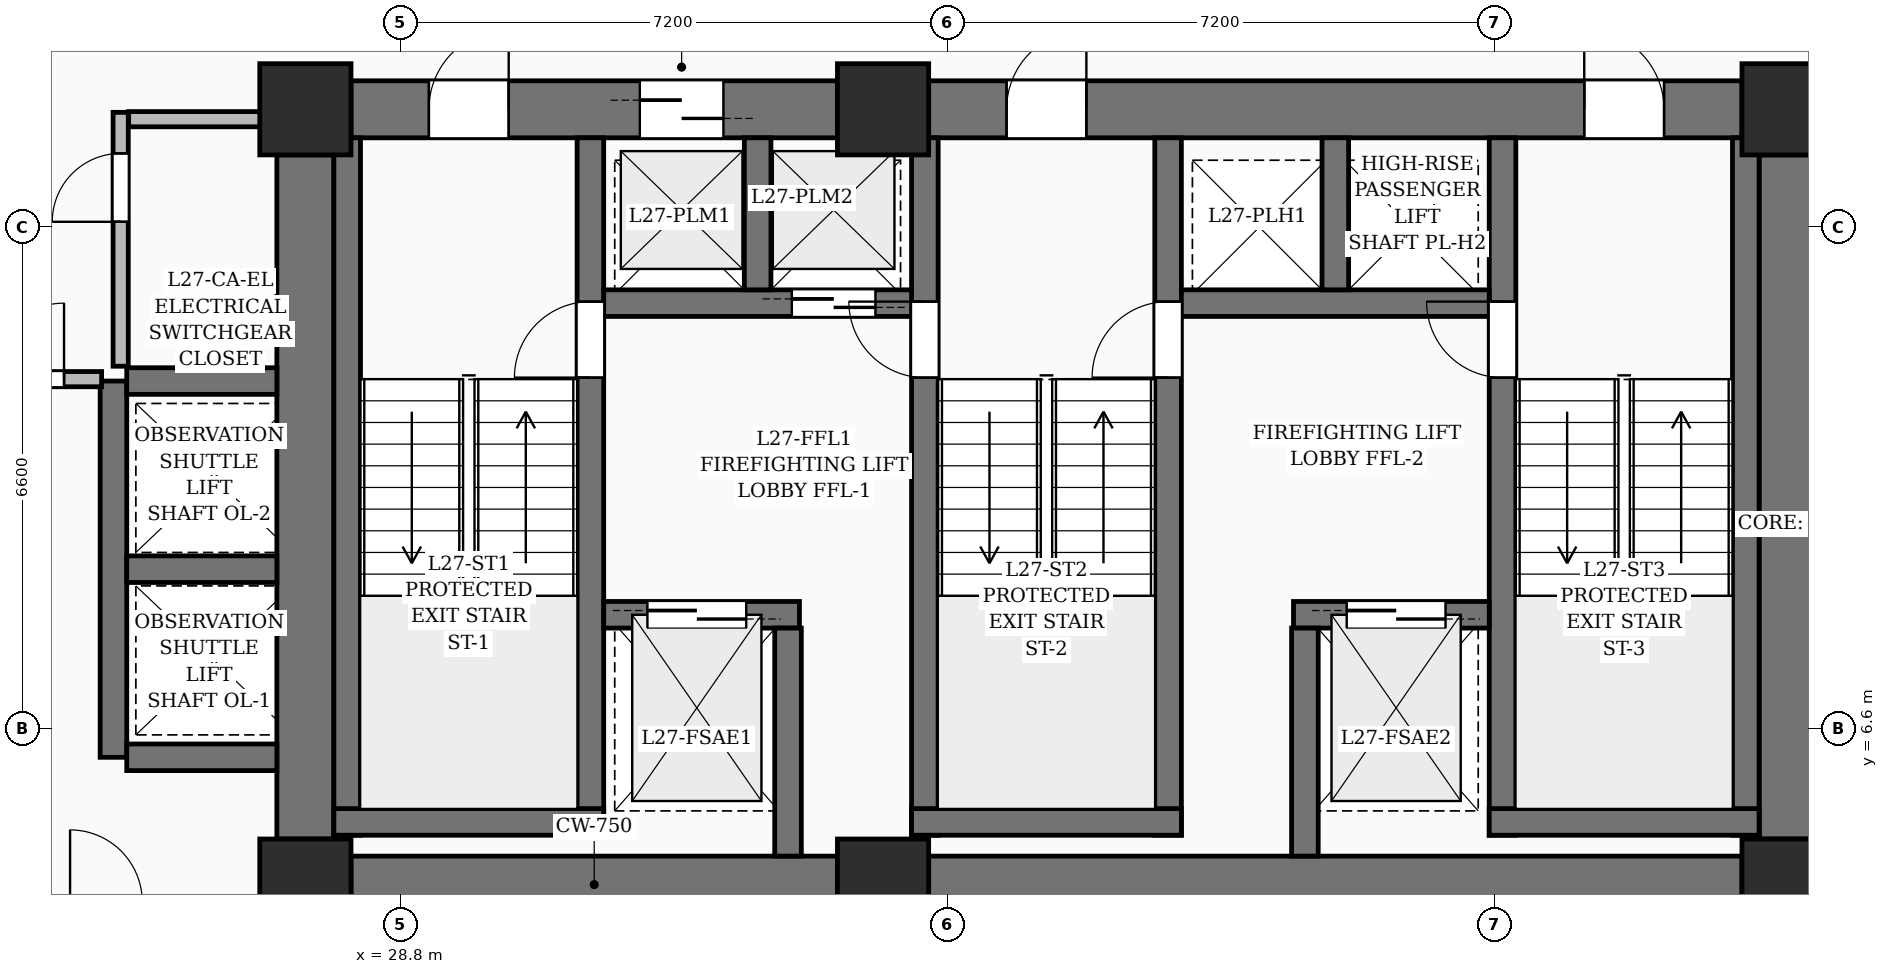
"""IFC4 building model, lengths in metres.
Left out: names, types, materials, properties, quantities, classifications, styles, units other than length and angle.
Written with IfcOpenShell. Run it as: python <this file> out.ifc"""

import sys

from ifc_helpers import new_model, si_unit, direction, frame, frame_2d, origin, origin_2d, place, context, subcontext, project, spatial, rectangle, extrude, element, fill, save


model = new_model("IFC4")
c1 = context("Model", 3, precision=1e-05, world=origin(), true_north=direction((0.0, 1.0)))
c2 = subcontext(c1, "Body", "Model", "MODEL_VIEW")
j1 = project(units=[si_unit("LENGTHUNIT", "METRE"), si_unit("PLANEANGLEUNIT", "RADIAN")], contexts=[c1])
p1 = place(None, origin())
s1 = spatial("IfcSite", under=j1, at=p1, CompositionType="ELEMENT")
p2 = place(p1, origin())
s2 = spatial("IfcBuilding", under=s1, at=p2, CompositionType="ELEMENT")
p3 = place(p2, frame((0.0, 0.0, 110.4)))
s3 = spatial("IfcBuildingStorey", under=s2, at=p3, CompositionType="ELEMENT", Elevation=110.4)
for number, where, z_axis, x_axis in (
    (1, (27.55, 4.55, 0.0), (0.0, 0.0, 1.0), (1.0, 0.0, 0.0)),
    (2, (35.15, 4.55, 0.0), (0.0, 0.0, 1.0), (1.0, 0.0, 0.0)),
    (3, (47.05, 4.55, 0.0), (0.0, 0.0, 1.0), (1.0, 0.0, 0.0)),
    (4, (27.55, 14.75, 0.0), (0.0, 0.0, 1.0), (1.0, 0.0, 0.0)),
    (5, (35.15, 14.75, 0.0), (0.0, 0.0, 1.0), (1.0, 0.0, 0.0)),
    (6, (47.05, 14.75, 0.0), (0.0, 0.0, 1.0), (1.0, 0.0, 0.0)),
):
    element("IfcColumn", number, at=place(p3, frame(where, z_axis=z_axis, x_axis=x_axis)), inside=s3, PredefinedType="COLUMN", context=c2, shape_type="SweptSolid", body=[
        extrude(rectangle(XDim=1.2, YDim=1.2, at=origin_2d()), origin(), (0.0, 0.0, 1.0), 3.6),
    ])
p4 = place(p3, frame((28.15, 4.55, 0.0), z_axis=(0.0, 0.0, 1.0), x_axis=(1.0, 0.0, 0.0)))
e7 = element("IfcWall", 7, at=p4, inside=s3, PredefinedType="SHEAR", context=c2, shape_type="SweptSolid", body=[
    extrude(rectangle(XDim=6.4, YDim=0.75, at=frame_2d((3.2, 0.0))), origin(), (0.0, 0.0, 1.0), 3.6),
])
p5 = place(p3, frame((35.75, 4.55, 0.0), z_axis=(0.0, 0.0, 1.0), x_axis=(1.0, 0.0, 0.0)))
e8 = element("IfcWall", 8, at=p5, inside=s3, PredefinedType="SHEAR", context=c2, shape_type="SweptSolid", body=[
    extrude(rectangle(XDim=10.7, YDim=0.75, at=frame_2d((5.35, 0.0))), origin(), (0.0, 0.0, 1.0), 3.6),
])
p6 = place(p3, frame((28.15, 14.75, 0.0), z_axis=(0.0, 0.0, 1.0), x_axis=(1.0, 0.0, 0.0)))
e9 = element("IfcWall", 9, at=p6, inside=s3, PredefinedType="SHEAR", context=c2, shape_type="SweptSolid", body=[
    extrude(rectangle(XDim=6.4, YDim=0.75, at=frame_2d((3.2, 0.0))), origin(), (0.0, 0.0, 1.0), 3.6),
])
p7 = place(p6, frame((1.025, 0.0, 0.0)))
e10 = element("IfcOpeningElement", 10, at=p7, cuts=e9, PredefinedType="OPENING", context=c2, shape_type="SweptSolid", body=[
    extrude(rectangle(XDim=1.05, YDim=2.15, at=frame_2d((0.525, 1.075))), frame((0.0, 0.385, 0.0), z_axis=(0.0, -1.0, 0.0), x_axis=(1.0, 0.0, 0.0)), (0.0, 0.0, 1.0), 0.77),
])
p8 = place(p6, frame((3.8, 0.0, 0.0)))
e11 = element("IfcOpeningElement", 11, at=p8, cuts=e9, PredefinedType="OPENING", context=c2, shape_type="SweptSolid", body=[
    extrude(rectangle(XDim=1.1, YDim=2.2, at=frame_2d((0.55, 1.1))), frame((0.0, 0.385, 0.0), z_axis=(0.0, -1.0, 0.0), x_axis=(1.0, 0.0, 0.0)), (0.0, 0.0, 1.0), 0.77),
])
p9 = place(p3, frame((35.75, 14.75, 0.0), z_axis=(0.0, 0.0, 1.0), x_axis=(1.0, 0.0, 0.0)))
e12 = element("IfcWall", 12, at=p9, inside=s3, PredefinedType="SHEAR", context=c2, shape_type="SweptSolid", body=[
    extrude(rectangle(XDim=10.7, YDim=0.75, at=frame_2d((5.35, 0.0))), origin(), (0.0, 0.0, 1.0), 3.6),
])
p10 = place(p9, frame((1.025, 0.0, 0.0)))
e13 = element("IfcOpeningElement", 13, at=p10, cuts=e12, PredefinedType="OPENING", context=c2, shape_type="SweptSolid", body=[
    extrude(rectangle(XDim=1.05, YDim=2.15, at=frame_2d((0.525, 1.075))), frame((0.0, 0.385, 0.0), z_axis=(0.0, -1.0, 0.0), x_axis=(1.0, 0.0, 0.0)), (0.0, 0.0, 1.0), 0.77),
])
p11 = place(p9, frame((8.625, 0.0, 0.0)))
e14 = element("IfcOpeningElement", 14, at=p11, cuts=e12, PredefinedType="OPENING", context=c2, shape_type="SweptSolid", body=[
    extrude(rectangle(XDim=1.05, YDim=2.15, at=frame_2d((0.525, 1.075))), frame((0.0, 0.385, 0.0), z_axis=(0.0, -1.0, 0.0), x_axis=(1.0, 0.0, 0.0)), (0.0, 0.0, 1.0), 0.77),
])
for number, where, z_axis, x_axis in (
    (15, (27.55, 5.15, 0.0), (0.0, 0.0, 1.0), (0.0, 1.0, 0.0)),
    (16, (47.05, 5.15, 0.0), (0.0, 0.0, 1.0), (0.0, 1.0, 0.0)),
):
    element("IfcWall", number, at=place(p3, frame(where, z_axis=z_axis, x_axis=x_axis)), inside=s3, PredefinedType="SHEAR", context=c2, shape_type="SweptSolid", body=[
        extrude(rectangle(XDim=9.0, YDim=0.75, at=frame_2d((4.5, 0.0))), origin(), (0.0, 0.0, 1.0), 3.6),
    ])
p12 = place(p3, frame((28.1, 5.2, 0.0), z_axis=(0.0, 0.0, 1.0), x_axis=(0.0, 1.0, 0.0)))
e17 = element("IfcWall", 17, at=p12, inside=s3, PredefinedType="SOLIDWALL", context=c2, shape_type="SweptSolid", body=[
    extrude(rectangle(XDim=9.175, YDim=0.35, at=frame_2d((4.587, 0.0))), origin(), (0.0, 0.0, 1.0), 3.6),
])
p13 = place(p3, frame((31.3, 5.2, 0.0), z_axis=(0.0, 0.0, 1.0), x_axis=(0.0, 1.0, 0.0)))
e18 = element("IfcWall", 18, at=p13, inside=s3, PredefinedType="SOLIDWALL", context=c2, shape_type="SweptSolid", body=[
    extrude(rectangle(XDim=9.175, YDim=0.35, at=frame_2d((4.587, 0.0))), origin(), (0.0, 0.0, 1.0), 3.6),
])
p14 = place(p13, frame((6.02, 0.0, 0.0)))
e19 = element("IfcOpeningElement", 19, at=p14, cuts=e18, PredefinedType="OPENING", context=c2, shape_type="SweptSolid", body=[
    extrude(rectangle(XDim=1.0, YDim=2.15, at=frame_2d((0.5, 1.075))), frame((0.0, 0.185, 0.0), z_axis=(0.0, -1.0, 0.0), x_axis=(1.0, 0.0, 0.0)), (0.0, 0.0, 1.0), 0.37),
])
p15 = place(p3, frame((27.925, 5.375, 0.0), z_axis=(0.0, 0.0, 1.0), x_axis=(1.0, 0.0, 0.0)))
e20 = element("IfcWall", 20, at=p15, inside=s3, PredefinedType="SOLIDWALL", context=c2, shape_type="SweptSolid", body=[
    extrude(rectangle(XDim=3.55, YDim=0.35, at=frame_2d((1.775, 0.0))), origin(), (0.0, 0.0, 1.0), 3.6),
])
p16 = place(p3, frame((35.7, 5.2, 0.0), z_axis=(0.0, 0.0, 1.0), x_axis=(0.0, 1.0, 0.0)))
e21 = element("IfcWall", 21, at=p16, inside=s3, PredefinedType="SOLIDWALL", context=c2, shape_type="SweptSolid", body=[
    extrude(rectangle(XDim=9.175, YDim=0.35, at=frame_2d((4.587, 0.0))), origin(), (0.0, 0.0, 1.0), 3.6),
])
p17 = place(p16, frame((6.02, 0.0, 0.0)))
e22 = element("IfcOpeningElement", 22, at=p17, cuts=e21, PredefinedType="OPENING", context=c2, shape_type="SweptSolid", body=[
    extrude(rectangle(XDim=1.0, YDim=2.15, at=frame_2d((0.5, 1.075))), frame((0.0, 0.185, 0.0), z_axis=(0.0, -1.0, 0.0), x_axis=(1.0, 0.0, 0.0)), (0.0, 0.0, 1.0), 0.37),
])
p18 = place(p3, frame((38.9, 5.2, 0.0), z_axis=(0.0, 0.0, 1.0), x_axis=(0.0, 1.0, 0.0)))
e23 = element("IfcWall", 23, at=p18, inside=s3, PredefinedType="SOLIDWALL", context=c2, shape_type="SweptSolid", body=[
    extrude(rectangle(XDim=9.175, YDim=0.35, at=frame_2d((4.587, 0.0))), origin(), (0.0, 0.0, 1.0), 3.6),
])
p19 = place(p18, frame((6.02, 0.0, 0.0)))
e24 = element("IfcOpeningElement", 24, at=p19, cuts=e23, PredefinedType="OPENING", context=c2, shape_type="SweptSolid", body=[
    extrude(rectangle(XDim=1.0, YDim=2.15, at=frame_2d((0.5, 1.075))), frame((0.0, 0.185, 0.0), z_axis=(0.0, -1.0, 0.0), x_axis=(1.0, 0.0, 0.0)), (0.0, 0.0, 1.0), 0.37),
])
p20 = place(p3, frame((35.525, 5.375, 0.0), z_axis=(0.0, 0.0, 1.0), x_axis=(1.0, 0.0, 0.0)))
e25 = element("IfcWall", 25, at=p20, inside=s3, PredefinedType="SOLIDWALL", context=c2, shape_type="SweptSolid", body=[
    extrude(rectangle(XDim=3.55, YDim=0.35, at=frame_2d((1.775, 0.0))), origin(), (0.0, 0.0, 1.0), 3.6),
])
p21 = place(p3, frame((43.3, 5.2, 0.0), z_axis=(0.0, 0.0, 1.0), x_axis=(0.0, 1.0, 0.0)))
e26 = element("IfcWall", 26, at=p21, inside=s3, PredefinedType="SOLIDWALL", context=c2, shape_type="SweptSolid", body=[
    extrude(rectangle(XDim=9.175, YDim=0.35, at=frame_2d((4.587, 0.0))), origin(), (0.0, 0.0, 1.0), 3.6),
])
p22 = place(p21, frame((6.02, 0.0, 0.0)))
e27 = element("IfcOpeningElement", 27, at=p22, cuts=e26, PredefinedType="OPENING", context=c2, shape_type="SweptSolid", body=[
    extrude(rectangle(XDim=1.0, YDim=2.15, at=frame_2d((0.5, 1.075))), frame((0.0, 0.185, 0.0), z_axis=(0.0, -1.0, 0.0), x_axis=(1.0, 0.0, 0.0)), (0.0, 0.0, 1.0), 0.37),
])
p23 = place(p3, frame((46.5, 5.2, 0.0), z_axis=(0.0, 0.0, 1.0), x_axis=(0.0, 1.0, 0.0)))
e28 = element("IfcWall", 28, at=p23, inside=s3, PredefinedType="SOLIDWALL", context=c2, shape_type="SweptSolid", body=[
    extrude(rectangle(XDim=9.175, YDim=0.35, at=frame_2d((4.587, 0.0))), origin(), (0.0, 0.0, 1.0), 3.6),
])
p24 = place(p3, frame((43.125, 5.375, 0.0), z_axis=(0.0, 0.0, 1.0), x_axis=(1.0, 0.0, 0.0)))
e29 = element("IfcWall", 29, at=p24, inside=s3, PredefinedType="SOLIDWALL", context=c2, shape_type="SweptSolid", body=[
    extrude(rectangle(XDim=3.55, YDim=0.35, at=frame_2d((1.775, 0.0))), origin(), (0.0, 0.0, 1.0), 3.6),
])
p25 = place(p3, frame((31.475, 8.1, 0.0), z_axis=(0.0, 0.0, 1.0), x_axis=(1.0, 0.0, 0.0)))
e30 = element("IfcWall", 30, at=p25, inside=s3, PredefinedType="SOLIDWALL", context=c2, shape_type="SweptSolid", body=[
    extrude(rectangle(XDim=2.575, YDim=0.35, at=frame_2d((1.288, 0.0))), origin(), (0.0, 0.0, 1.0), 3.6),
])
p26 = place(p25, frame((0.575, 0.0, 0.0)))
e31 = element("IfcOpeningElement", 31, at=p26, cuts=e30, PredefinedType="OPENING", context=c2, shape_type="SweptSolid", body=[
    extrude(rectangle(XDim=1.3, YDim=2.25, at=frame_2d((0.65, 1.125))), frame((0.0, 0.185, 0.0), z_axis=(0.0, -1.0, 0.0), x_axis=(1.0, 0.0, 0.0)), (0.0, 0.0, 1.0), 0.37),
])
p27 = place(p3, frame((40.55, 8.1, 0.0), z_axis=(0.0, 0.0, 1.0), x_axis=(1.0, 0.0, 0.0)))
e32 = element("IfcWall", 32, at=p27, inside=s3, PredefinedType="SOLIDWALL", context=c2, shape_type="SweptSolid", body=[
    extrude(rectangle(XDim=2.575, YDim=0.35, at=frame_2d((1.288, 0.0))), origin(), (0.0, 0.0, 1.0), 3.6),
])
p28 = place(p27, frame((0.7, 0.0, 0.0)))
e33 = element("IfcOpeningElement", 33, at=p28, cuts=e32, PredefinedType="OPENING", context=c2, shape_type="SweptSolid", body=[
    extrude(rectangle(XDim=1.3, YDim=2.25, at=frame_2d((0.65, 1.125))), frame((0.0, 0.185, 0.0), z_axis=(0.0, -1.0, 0.0), x_axis=(1.0, 0.0, 0.0)), (0.0, 0.0, 1.0), 0.37),
])
for number, where, z_axis, x_axis in (
    (34, (33.9, 4.925, 0.0), (0.0, 0.0, 1.0), (0.0, 1.0, 0.0)),
    (35, (40.7, 4.925, 0.0), (0.0, 0.0, 1.0), (0.0, 1.0, 0.0)),
):
    element("IfcWall", number, at=place(p3, frame(where, z_axis=z_axis, x_axis=x_axis)), inside=s3, PredefinedType="SOLIDWALL", context=c2, shape_type="SweptSolid", body=[
        extrude(rectangle(XDim=3.0, YDim=0.35, at=frame_2d((1.5, 0.0))), origin(), (0.0, 0.0, 1.0), 3.6),
    ])
p29 = place(p3, frame((31.475, 12.2, 0.0), z_axis=(0.0, 0.0, 1.0), x_axis=(1.0, 0.0, 0.0)))
e36 = element("IfcWall", 36, at=p29, inside=s3, PredefinedType="SOLIDWALL", context=c2, shape_type="SweptSolid", body=[
    extrude(rectangle(XDim=4.05, YDim=0.35, at=frame_2d((2.025, 0.0))), origin(), (0.0, 0.0, 1.0), 3.6),
])
p30 = place(p29, frame((2.475, 0.0, 0.0)))
e37 = element("IfcOpeningElement", 37, at=p30, cuts=e36, PredefinedType="OPENING", context=c2, shape_type="SweptSolid", body=[
    extrude(rectangle(XDim=1.1, YDim=2.2, at=frame_2d((0.55, 1.1))), frame((0.0, 0.185, 0.0), z_axis=(0.0, -1.0, 0.0), x_axis=(1.0, 0.0, 0.0)), (0.0, 0.0, 1.0), 0.37),
])
p31 = place(p3, frame((33.5, 12.375, 0.0), z_axis=(0.0, 0.0, 1.0), x_axis=(0.0, 1.0, 0.0)))
e38 = element("IfcWall", 38, at=p31, inside=s3, PredefinedType="SOLIDWALL", context=c2, shape_type="SweptSolid", body=[
    extrude(rectangle(XDim=2.0, YDim=0.35, at=frame_2d((1.0, 0.0))), origin(), (0.0, 0.0, 1.0), 3.6),
])
p32 = place(p3, frame((39.075, 12.2, 0.0), z_axis=(0.0, 0.0, 1.0), x_axis=(1.0, 0.0, 0.0)))
e39 = element("IfcWall", 39, at=p32, inside=s3, PredefinedType="SOLIDWALL", context=c2, shape_type="SweptSolid", body=[
    extrude(rectangle(XDim=4.05, YDim=0.35, at=frame_2d((2.025, 0.0))), origin(), (0.0, 0.0, 1.0), 3.6),
])
p33 = place(p3, frame((41.1, 12.375, 0.0), z_axis=(0.0, 0.0, 1.0), x_axis=(0.0, 1.0, 0.0)))
e40 = element("IfcWall", 40, at=p33, inside=s3, PredefinedType="SOLIDWALL", context=c2, shape_type="SweptSolid", body=[
    extrude(rectangle(XDim=2.0, YDim=0.35, at=frame_2d((1.0, 0.0))), origin(), (0.0, 0.0, 1.0), 3.6),
])
p34 = place(p3, frame((25.025, 6.225, 0.0), z_axis=(0.0, 0.0, 1.0), x_axis=(0.0, 1.0, 0.0)))
e41 = element("IfcWall", 41, at=p34, inside=s3, PredefinedType="SOLIDWALL", context=c2, shape_type="SweptSolid", body=[
    extrude(rectangle(XDim=4.95, YDim=0.35, at=frame_2d((2.475, 0.0))), origin(), (0.0, 0.0, 1.0), 3.6),
])
for number, where, z_axis, x_axis in (
    (42, (25.2, 6.225, 0.0), (0.0, 0.0, 1.0), (1.0, 0.0, 0.0)),
    (43, (25.2, 8.7, 0.0), (0.0, 0.0, 1.0), (1.0, 0.0, 0.0)),
    (44, (25.2, 11.175, 0.0), (0.0, 0.0, 1.0), (1.0, 0.0, 0.0)),
):
    element("IfcWall", number, at=place(p3, frame(where, z_axis=z_axis, x_axis=x_axis)), inside=s3, PredefinedType="SOLIDWALL", context=c2, shape_type="SweptSolid", body=[
        extrude(rectangle(XDim=1.975, YDim=0.35, at=frame_2d((0.988, 0.0))), origin(), (0.0, 0.0, 1.0), 3.6),
    ])
p35 = place(p3, frame((25.12, 11.37, 0.0), z_axis=(0.0, 0.0, 1.0), x_axis=(0.0, 1.0, 0.0)))
e45 = element("IfcWall", 45, at=p35, inside=s3, PredefinedType="PARTITIONING", context=c2, shape_type="SweptSolid", body=[
    extrude(rectangle(XDim=3.34, YDim=0.2, at=frame_2d((1.67, 0.0))), origin(), (0.0, 0.0, 1.0), 3.35),
])
p36 = place(p35, frame((1.9, 0.0, 0.0)))
e46 = element("IfcOpeningElement", 46, at=p36, cuts=e45, PredefinedType="OPENING", context=c2, shape_type="SweptSolid", body=[
    extrude(rectangle(XDim=0.9, YDim=2.1, at=frame_2d((0.45, 1.05))), frame((0.0, 0.11, 0.0), z_axis=(0.0, -1.0, 0.0), x_axis=(1.0, 0.0, 0.0)), (0.0, 0.0, 1.0), 0.22),
])
p37 = place(p3, frame((25.225, 14.62, 0.0), z_axis=(0.0, 0.0, 1.0), x_axis=(1.0, 0.0, 0.0)))
e47 = element("IfcWall", 47, at=p37, inside=s3, PredefinedType="PARTITIONING", context=c2, shape_type="SweptSolid", body=[
    extrude(rectangle(XDim=1.935, YDim=0.2, at=frame_2d((0.967, 0.0))), origin(), (0.0, 0.0, 1.0), 3.35),
])
p38 = place(p3, frame((22.8, 11.2, 0.0), z_axis=(0.0, 0.0, 1.0), x_axis=(1.0, 0.0, 0.0)))
e48 = element("IfcWall", 48, at=p38, inside=s3, PredefinedType="PARTITIONING", context=c2, shape_type="SweptSolid", body=[
    extrude(rectangle(XDim=2.069, YDim=0.2, at=frame_2d((1.035, 0.0))), origin(), (0.0, 0.0, 1.0), 3.35),
])
p39 = place(p38, frame((0.575, 0.0, 0.0)))
e49 = element("IfcOpeningElement", 49, at=p39, cuts=e48, PredefinedType="OPENING", context=c2, shape_type="SweptSolid", body=[
    extrude(rectangle(XDim=1.0, YDim=2.2, at=frame_2d((0.5, 1.1))), frame((0.0, 0.11, 0.0), z_axis=(0.0, -1.0, 0.0), x_axis=(1.0, 0.0, 0.0)), (0.0, 0.0, 1.0), 0.22),
])
p40 = place(p7, origin())
e50 = element("IfcDoor", 50, at=p40, inside=s3, OperationType="SINGLE_SWING_RIGHT", PredefinedType="DOOR", context=c2, shape_type="SweptSolid", body=[
    extrude(rectangle(XDim=1.05, YDim=2.15, at=frame_2d((0.525, 1.075))), frame((0.0, 0.025, 0.0), z_axis=(0.0, -1.0, 0.0), x_axis=(1.0, 0.0, 0.0)), (0.0, 0.0, 1.0), 0.05),
])
fill(e10, e50)
p41 = place(p10, origin())
e51 = element("IfcDoor", 51, at=p41, inside=s3, OperationType="SINGLE_SWING_RIGHT", PredefinedType="DOOR", context=c2, shape_type="SweptSolid", body=[
    extrude(rectangle(XDim=1.05, YDim=2.15, at=frame_2d((0.525, 1.075))), frame((0.0, 0.025, 0.0), z_axis=(0.0, -1.0, 0.0), x_axis=(1.0, 0.0, 0.0)), (0.0, 0.0, 1.0), 0.05),
])
fill(e13, e51)
p42 = place(p11, origin())
e52 = element("IfcDoor", 52, at=p42, inside=s3, OperationType="SINGLE_SWING_LEFT", PredefinedType="DOOR", context=c2, shape_type="SweptSolid", body=[
    extrude(rectangle(XDim=1.05, YDim=2.15, at=frame_2d((0.525, 1.075))), frame((0.0, 0.025, 0.0), z_axis=(0.0, -1.0, 0.0), x_axis=(1.0, 0.0, 0.0)), (0.0, 0.0, 1.0), 0.05),
])
fill(e14, e52)
p43 = place(p14, origin())
e53 = element("IfcDoor", 53, at=p43, inside=s3, OperationType="SINGLE_SWING_LEFT", PredefinedType="DOOR", context=c2, shape_type="SweptSolid", body=[
    extrude(rectangle(XDim=1.0, YDim=2.15, at=frame_2d((0.5, 1.075))), frame((0.0, 0.025, 0.0), z_axis=(0.0, -1.0, 0.0), x_axis=(1.0, 0.0, 0.0)), (0.0, 0.0, 1.0), 0.05),
])
fill(e19, e53)
p44 = place(p17, origin())
e54 = element("IfcDoor", 54, at=p44, inside=s3, OperationType="SINGLE_SWING_RIGHT", PredefinedType="DOOR", context=c2, shape_type="SweptSolid", body=[
    extrude(rectangle(XDim=1.0, YDim=2.15, at=frame_2d((0.5, 1.075))), frame((0.0, 0.025, 0.0), z_axis=(0.0, -1.0, 0.0), x_axis=(1.0, 0.0, 0.0)), (0.0, 0.0, 1.0), 0.05),
])
fill(e22, e54)
p45 = place(p19, origin())
e55 = element("IfcDoor", 55, at=p45, inside=s3, OperationType="SINGLE_SWING_LEFT", PredefinedType="DOOR", context=c2, shape_type="SweptSolid", body=[
    extrude(rectangle(XDim=1.0, YDim=2.15, at=frame_2d((0.5, 1.075))), frame((0.0, 0.025, 0.0), z_axis=(0.0, -1.0, 0.0), x_axis=(1.0, 0.0, 0.0)), (0.0, 0.0, 1.0), 0.05),
])
fill(e24, e55)
p46 = place(p22, origin())
e56 = element("IfcDoor", 56, at=p46, inside=s3, OperationType="SINGLE_SWING_RIGHT", PredefinedType="DOOR", context=c2, shape_type="SweptSolid", body=[
    extrude(rectangle(XDim=1.0, YDim=2.15, at=frame_2d((0.5, 1.075))), frame((0.0, 0.025, 0.0), z_axis=(0.0, -1.0, 0.0), x_axis=(1.0, 0.0, 0.0)), (0.0, 0.0, 1.0), 0.05),
])
fill(e27, e56)
p47 = place(p26, origin())
e57 = element("IfcDoor", 57, at=p47, inside=s3, OperationType="DOUBLE_DOOR_SLIDING", PredefinedType="DOOR", context=c2, shape_type="SweptSolid", body=[
    extrude(rectangle(XDim=1.3, YDim=2.25, at=frame_2d((0.65, 1.125))), frame((0.0, 0.025, 0.0), z_axis=(0.0, -1.0, 0.0), x_axis=(1.0, 0.0, 0.0)), (0.0, 0.0, 1.0), 0.05),
])
fill(e31, e57)
p48 = place(p28, origin())
e58 = element("IfcDoor", 58, at=p48, inside=s3, OperationType="DOUBLE_DOOR_SLIDING", PredefinedType="DOOR", context=c2, shape_type="SweptSolid", body=[
    extrude(rectangle(XDim=1.3, YDim=2.25, at=frame_2d((0.65, 1.125))), frame((0.0, 0.025, 0.0), z_axis=(0.0, -1.0, 0.0), x_axis=(1.0, 0.0, 0.0)), (0.0, 0.0, 1.0), 0.05),
])
fill(e33, e58)
p49 = place(p8, origin())
e59 = element("IfcDoor", 59, at=p49, inside=s3, OperationType="DOUBLE_DOOR_SLIDING", PredefinedType="DOOR", context=c2, shape_type="SweptSolid", body=[
    extrude(rectangle(XDim=1.1, YDim=2.2, at=frame_2d((0.55, 1.1))), frame((0.0, 0.025, 0.0), z_axis=(0.0, -1.0, 0.0), x_axis=(1.0, 0.0, 0.0)), (0.0, 0.0, 1.0), 0.05),
])
fill(e11, e59)
p50 = place(p30, origin())
e60 = element("IfcDoor", 60, at=p50, inside=s3, OperationType="DOUBLE_DOOR_SLIDING", PredefinedType="DOOR", context=c2, shape_type="SweptSolid", body=[
    extrude(rectangle(XDim=1.1, YDim=2.2, at=frame_2d((0.55, 1.1))), frame((0.0, 0.025, 0.0), z_axis=(0.0, -1.0, 0.0), x_axis=(1.0, 0.0, 0.0)), (0.0, 0.0, 1.0), 0.05),
])
fill(e37, e60)
p51 = place(p36, origin())
e61 = element("IfcDoor", 61, at=p51, inside=s3, OperationType="SINGLE_SWING_LEFT", PredefinedType="DOOR", context=c2, shape_type="SweptSolid", body=[
    extrude(rectangle(XDim=0.9, YDim=2.1, at=frame_2d((0.45, 1.05))), frame((0.0, 0.025, 0.0), z_axis=(0.0, -1.0, 0.0), x_axis=(1.0, 0.0, 0.0)), (0.0, 0.0, 1.0), 0.05),
])
fill(e46, e61)
p52 = place(p39, origin())
e62 = element("IfcDoor", 62, at=p52, inside=s3, OperationType="SINGLE_SWING_RIGHT", PredefinedType="DOOR", context=c2, shape_type="SweptSolid", body=[
    extrude(rectangle(XDim=1.0, YDim=2.2, at=frame_2d((0.5, 1.1))), frame((0.0, 0.025, 0.0), z_axis=(0.0, -1.0, 0.0), x_axis=(1.0, 0.0, 0.0)), (0.0, 0.0, 1.0), 0.05),
])
fill(e49, e62)
save(model, sys.argv[1])
